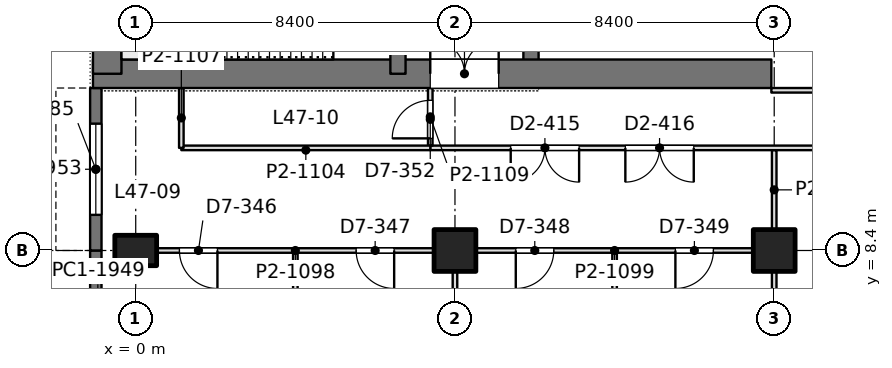
"""IFC4 building model, lengths in metres.
Left out: names, types, materials, properties, quantities, classifications, styles, units other than length and angle.
Written with IfcOpenShell. Run it as: python <this file> out.ifc"""

import sys

from ifc_helpers import new_model, si_unit, direction, frame, frame_2d, origin, origin_2d, place, context, subcontext, project, spatial, rectangle, extrude, element, fill, save


model = new_model("IFC4")
c1 = context("Model", 3, precision=1e-05, world=origin(), true_north=direction((0.0, 1.0)))
c2 = subcontext(c1, "Body", "Model", "MODEL_VIEW")
j1 = project(units=[si_unit("LENGTHUNIT", "METRE"), si_unit("PLANEANGLEUNIT", "RADIAN")], contexts=[c1])
p1 = place(None, origin())
s1 = spatial("IfcSite", under=j1, at=p1, CompositionType="ELEMENT")
p2 = place(p1, origin())
s2 = spatial("IfcBuilding", under=s1, at=p2, CompositionType="ELEMENT")
p3 = place(p2, frame((0.0, 0.0, 207.0)))
s3 = spatial("IfcBuildingStorey", under=s2, at=p3, CompositionType="ELEMENT", Elevation=207.0)
p4 = place(p3, frame((0.0, 8.4, 0.0), z_axis=(0.0, 0.0, 1.0), x_axis=(0.0, 1.0, 0.0)))
e1 = element("IfcColumn", 1, at=p4, inside=s3, PredefinedType="COLUMN", context=c2, shape_type="SweptSolid", body=[
    extrude(rectangle(XDim=0.8, YDim=1.1, at=origin_2d()), origin(), (0.0, 0.0, 1.0), 4.2),
])
for number, where, z_axis, x_axis in (
    (2, (8.4, 8.4, 0.0), (0.0, 0.0, 1.0), (1.0, 0.0, 0.0)),
    (3, (16.8, 8.4, 0.0), (0.0, 0.0, 1.0), (1.0, 0.0, 0.0)),
):
    element("IfcColumn", number, at=place(p3, frame(where, z_axis=z_axis, x_axis=x_axis)), inside=s3, PredefinedType="COLUMN", context=c2, shape_type="SweptSolid", body=[
        extrude(rectangle(XDim=1.1, YDim=1.1, at=origin_2d()), origin(), (0.0, 0.0, 1.0), 4.2),
    ])
p5 = place(p3, frame((-1.125, 13.05, 0.0), z_axis=(0.0, 0.0, 1.0), x_axis=(1.0, 0.0, 0.0)))
e4 = element("IfcWall", 4, at=p5, inside=s3, PredefinedType="SHEAR", context=c2, shape_type="SweptSolid", body=[
    extrude(rectangle(XDim=17.85, YDim=0.75, at=frame_2d((8.925, 0.0))), origin(), (0.0, 0.0, 1.0), 4.2),
])
p6 = place(p5, frame((8.875, 0.0, 0.0)))
e5 = element("IfcOpeningElement", 5, at=p6, cuts=e4, PredefinedType="OPENING", context=c2, shape_type="SweptSolid", body=[
    extrude(rectangle(XDim=1.8, YDim=2.4, at=frame_2d((0.9, 1.2))), frame((0.0, 0.385, 0.0), z_axis=(0.0, -1.0, 0.0), x_axis=(1.0, 0.0, 0.0)), (0.0, 0.0, 1.0), 0.77),
])
p7 = place(p3, frame((-0.75, 13.05, 0.0), z_axis=(0.0, 0.0, 1.0), x_axis=(0.0, 1.0, 0.0)))
e6 = element("IfcWall", 6, at=p7, inside=s3, PredefinedType="SHEAR", context=c2, shape_type="SweptSolid", body=[
    extrude(rectangle(XDim=24.3, YDim=0.75, at=frame_2d((12.15, 0.0))), origin(), (0.0, 0.0, 1.0), 4.2),
])
p8 = place(p3, frame((6.9, 13.05, 0.0), z_axis=(0.0, 0.0, 1.0), x_axis=(0.0, 1.0, 0.0)))
e7 = element("IfcWall", 7, at=p8, inside=s3, PredefinedType="SHEAR", context=c2, shape_type="SweptSolid", body=[
    extrude(rectangle(XDim=24.3, YDim=0.4, at=frame_2d((12.15, 0.0))), origin(), (0.0, 0.0, 1.0), 4.2),
])
p9 = place(p8, frame((1.3, 0.0, 0.0)))
e8 = element("IfcOpeningElement", 8, at=p9, cuts=e7, PredefinedType="OPENING", context=c2, shape_type="SweptSolid", body=[
    extrude(rectangle(XDim=1.0, YDim=2.2, at=frame_2d((0.5, 1.1))), frame((0.0, 0.21, 0.0), z_axis=(0.0, -1.0, 0.0), x_axis=(1.0, 0.0, 0.0)), (0.0, 0.0, 1.0), 0.42),
])
p10 = place(p8, frame((22.0, 0.0, 0.0)))
e9 = element("IfcOpeningElement", 9, at=p10, cuts=e7, PredefinedType="OPENING", context=c2, shape_type="SweptSolid", body=[
    extrude(rectangle(XDim=1.0, YDim=2.2, at=frame_2d((0.5, 1.1))), frame((0.0, 0.21, 0.0), z_axis=(0.0, -1.0, 0.0), x_axis=(1.0, 0.0, 0.0)), (0.0, 0.0, 1.0), 0.42),
])
p11 = place(p8, frame((5.55, 0.0, 0.0)))
e10 = element("IfcOpeningElement", 10, at=p11, cuts=e7, PredefinedType="OPENING", context=c2, shape_type="SweptSolid", body=[
    extrude(rectangle(XDim=1.0, YDim=2.2, at=frame_2d((0.5, 1.1))), frame((0.0, 0.21, 0.0), z_axis=(0.0, -1.0, 0.0), x_axis=(1.0, 0.0, 0.0)), (0.0, 0.0, 1.0), 0.42),
])
p12 = place(p8, frame((9.55, 0.0, 0.0)))
e11 = element("IfcOpeningElement", 11, at=p12, cuts=e7, PredefinedType="OPENING", context=c2, shape_type="SweptSolid", body=[
    extrude(rectangle(XDim=1.0, YDim=2.2, at=frame_2d((0.5, 1.1))), frame((0.0, 0.21, 0.0), z_axis=(0.0, -1.0, 0.0), x_axis=(1.0, 0.0, 0.0)), (0.0, 0.0, 1.0), 0.42),
])
p13 = place(p8, frame((12.8, 0.0, 0.0)))
e12 = element("IfcOpeningElement", 12, at=p13, cuts=e7, PredefinedType="OPENING", context=c2, shape_type="SweptSolid", body=[
    extrude(rectangle(XDim=1.1, YDim=2.2, at=frame_2d((0.55, 1.1))), frame((0.0, 0.21, 0.0), z_axis=(0.0, -1.0, 0.0), x_axis=(1.0, 0.0, 0.0)), (0.0, 0.0, 1.0), 0.42),
])
p14 = place(p8, frame((15.538, 0.0, 0.0)))
e13 = element("IfcOpeningElement", 13, at=p14, cuts=e7, PredefinedType="OPENING", context=c2, shape_type="SweptSolid", body=[
    extrude(rectangle(XDim=1.1, YDim=2.2, at=frame_2d((0.55, 1.1))), frame((0.0, 0.21, 0.0), z_axis=(0.0, -1.0, 0.0), x_axis=(1.0, 0.0, 0.0)), (0.0, 0.0, 1.0), 0.42),
])
p15 = place(p8, frame((18.262, 0.0, 0.0)))
e14 = element("IfcOpeningElement", 14, at=p15, cuts=e7, PredefinedType="OPENING", context=c2, shape_type="SweptSolid", body=[
    extrude(rectangle(XDim=1.1, YDim=2.2, at=frame_2d((0.55, 1.1))), frame((0.0, 0.21, 0.0), z_axis=(0.0, -1.0, 0.0), x_axis=(1.0, 0.0, 0.0)), (0.0, 0.0, 1.0), 0.42),
])
p16 = place(p3, frame((10.4, 13.05, 0.0), z_axis=(0.0, 0.0, 1.0), x_axis=(0.0, 1.0, 0.0)))
e15 = element("IfcWall", 15, at=p16, inside=s3, PredefinedType="SHEAR", context=c2, shape_type="SweptSolid", body=[
    extrude(rectangle(XDim=24.3, YDim=0.4, at=frame_2d((12.15, 0.0))), origin(), (0.0, 0.0, 1.0), 4.2),
])
p17 = place(p16, frame((15.75, 0.0, 0.0)))
e16 = element("IfcOpeningElement", 16, at=p17, cuts=e15, PredefinedType="OPENING", context=c2, shape_type="SweptSolid", body=[
    extrude(rectangle(XDim=1.1, YDim=2.2, at=frame_2d((0.55, 1.1))), frame((0.0, 0.21, 0.0), z_axis=(0.0, -1.0, 0.0), x_axis=(1.0, 0.0, 0.0)), (0.0, 0.0, 1.0), 0.42),
])
p18 = place(p16, frame((18.6, 0.0, 0.0)))
e17 = element("IfcOpeningElement", 17, at=p18, cuts=e15, PredefinedType="OPENING", context=c2, shape_type="SweptSolid", body=[
    extrude(rectangle(XDim=1.1, YDim=2.2, at=frame_2d((0.55, 1.1))), frame((0.0, 0.21, 0.0), z_axis=(0.0, -1.0, 0.0), x_axis=(1.0, 0.0, 0.0)), (0.0, 0.0, 1.0), 0.42),
])
p19 = place(p16, frame((21.45, 0.0, 0.0)))
e18 = element("IfcOpeningElement", 18, at=p19, cuts=e15, PredefinedType="OPENING", context=c2, shape_type="SweptSolid", body=[
    extrude(rectangle(XDim=1.1, YDim=2.2, at=frame_2d((0.55, 1.1))), frame((0.0, 0.21, 0.0), z_axis=(0.0, -1.0, 0.0), x_axis=(1.0, 0.0, 0.0)), (0.0, 0.0, 1.0), 0.42),
])
p20 = place(p16, frame((8.65, 0.0, 0.0)))
e19 = element("IfcOpeningElement", 19, at=p20, cuts=e15, PredefinedType="OPENING", context=c2, shape_type="SweptSolid", body=[
    extrude(rectangle(XDim=1.8, YDim=2.4, at=frame_2d((0.9, 1.2))), frame((0.0, 0.21, 0.0), z_axis=(0.0, -1.0, 0.0), x_axis=(1.0, 0.0, 0.0)), (0.0, 0.0, 1.0), 0.42),
])
p21 = place(p3, frame((-1.05, 5.915, 0.0), z_axis=(0.0, 0.0, 1.0), x_axis=(0.0, 1.0, 0.0)))
e20 = element("IfcWall", 20, at=p21, inside=s3, PredefinedType="SOLIDWALL", context=c2, shape_type="SweptSolid", body=[
    extrude(rectangle(XDim=2.485, YDim=0.3, at=frame_2d((1.243, 0.0))), origin(), (0.0, 0.0, 1.0), 4.05),
])
p22 = place(p3, frame((-1.05, 8.4, 0.0), z_axis=(0.0, 0.0, 1.0), x_axis=(0.0, 1.0, 0.0)))
e21 = element("IfcWall", 21, at=p22, inside=s3, PredefinedType="SOLIDWALL", context=c2, shape_type="SweptSolid", body=[
    extrude(rectangle(XDim=4.275, YDim=0.3, at=frame_2d((2.138, 0.0))), origin(), (0.0, 0.0, 1.0), 4.05),
])
p23 = place(p22, frame((0.938, 0.0, 0.9)))
e22 = element("IfcOpeningElement", 22, at=p23, cuts=e21, PredefinedType="OPENING", context=c2, shape_type="SweptSolid", body=[
    extrude(rectangle(XDim=2.4, YDim=1.9, at=frame_2d((1.2, 0.95))), frame((0.0, 0.16, 0.0), z_axis=(0.0, -1.0, 0.0), x_axis=(1.0, 0.0, 0.0)), (0.0, 0.0, 1.0), 0.32),
])
p24 = place(p3, frame((0.549, 8.4, 0.0), z_axis=(0.0, 0.0, 1.0), x_axis=(1.0, 0.0, 0.0)))
e23 = element("IfcWall", 23, at=p24, inside=s3, PredefinedType="PARTITIONING", context=c2, shape_type="SweptSolid", body=[
    extrude(rectangle(XDim=7.302, YDim=0.12, at=frame_2d((3.651, 0.0))), origin(), (0.0, 0.0, 1.0), 3.55),
])
p25 = place(p24, frame((0.601, 0.0, 0.0)))
e24 = element("IfcOpeningElement", 24, at=p25, cuts=e23, PredefinedType="OPENING", context=c2, shape_type="SweptSolid", body=[
    extrude(rectangle(XDim=1.0, YDim=2.4, at=frame_2d((0.5, 1.2))), frame((0.0, 0.07, 0.0), z_axis=(0.0, -1.0, 0.0), x_axis=(1.0, 0.0, 0.0)), (0.0, 0.0, 1.0), 0.14),
])
p26 = place(p24, frame((5.251, 0.0, 0.0)))
e25 = element("IfcOpeningElement", 25, at=p26, cuts=e23, PredefinedType="OPENING", context=c2, shape_type="SweptSolid", body=[
    extrude(rectangle(XDim=1.0, YDim=2.4, at=frame_2d((0.5, 1.2))), frame((0.0, 0.07, 0.0), z_axis=(0.0, -1.0, 0.0), x_axis=(1.0, 0.0, 0.0)), (0.0, 0.0, 1.0), 0.14),
])
p27 = place(p3, frame((8.949, 8.4, 0.0), z_axis=(0.0, 0.0, 1.0), x_axis=(1.0, 0.0, 0.0)))
e26 = element("IfcWall", 26, at=p27, inside=s3, PredefinedType="PARTITIONING", context=c2, shape_type="SweptSolid", body=[
    extrude(rectangle(XDim=7.302, YDim=0.12, at=frame_2d((3.651, 0.0))), origin(), (0.0, 0.0, 1.0), 3.55),
])
p28 = place(p27, frame((1.051, 0.0, 0.0)))
e27 = element("IfcOpeningElement", 27, at=p28, cuts=e26, PredefinedType="OPENING", context=c2, shape_type="SweptSolid", body=[
    extrude(rectangle(XDim=1.0, YDim=2.4, at=frame_2d((0.5, 1.2))), frame((0.0, 0.07, 0.0), z_axis=(0.0, -1.0, 0.0), x_axis=(1.0, 0.0, 0.0)), (0.0, 0.0, 1.0), 0.14),
])
p29 = place(p27, frame((5.251, 0.0, 0.0)))
e28 = element("IfcOpeningElement", 28, at=p29, cuts=e26, PredefinedType="OPENING", context=c2, shape_type="SweptSolid", body=[
    extrude(rectangle(XDim=1.0, YDim=2.4, at=frame_2d((0.5, 1.2))), frame((0.0, 0.07, 0.0), z_axis=(0.0, -1.0, 0.0), x_axis=(1.0, 0.0, 0.0)), (0.0, 0.0, 1.0), 0.14),
])
p30 = place(p3, frame((4.2, 4.7, 0.0), z_axis=(0.0, 0.0, 1.0), x_axis=(0.0, 1.0, 0.0)))
e29 = element("IfcWall", 29, at=p30, inside=s3, PredefinedType="PARTITIONING", context=c2, shape_type="SweptSolid", body=[
    extrude(rectangle(XDim=3.642, YDim=0.12, at=frame_2d((1.821, 0.0))), origin(), (0.0, 0.0, 1.0), 3.55),
])
p31 = place(p3, frame((8.4, 6.149, 0.0), z_axis=(0.0, 0.0, 1.0), x_axis=(0.0, 1.0, 0.0)))
e30 = element("IfcWall", 30, at=p31, inside=s3, PredefinedType="PARTITIONING", context=c2, shape_type="SweptSolid", body=[
    extrude(rectangle(XDim=1.702, YDim=0.12, at=frame_2d((0.851, 0.0))), origin(), (0.0, 0.0, 1.0), 3.69),
])
p32 = place(p3, frame((12.6, 4.7, 0.0), z_axis=(0.0, 0.0, 1.0), x_axis=(0.0, 1.0, 0.0)))
e31 = element("IfcWall", 31, at=p32, inside=s3, PredefinedType="PARTITIONING", context=c2, shape_type="SweptSolid", body=[
    extrude(rectangle(XDim=3.642, YDim=0.12, at=frame_2d((1.821, 0.0))), origin(), (0.0, 0.0, 1.0), 3.55),
])
p33 = place(p3, frame((16.8, 6.149, 0.0), z_axis=(0.0, 0.0, 1.0), x_axis=(0.0, 1.0, 0.0)))
e32 = element("IfcWall", 32, at=p33, inside=s3, PredefinedType="PARTITIONING", context=c2, shape_type="SweptSolid", body=[
    extrude(rectangle(XDim=1.702, YDim=0.12, at=frame_2d((0.851, 0.0))), origin(), (0.0, 0.0, 1.0), 3.69),
])
p34 = place(p3, frame((16.8, 8.949, 0.0), z_axis=(0.0, 0.0, 1.0), x_axis=(0.0, 1.0, 0.0)))
e33 = element("IfcWall", 33, at=p34, inside=s3, PredefinedType="PARTITIONING", context=c2, shape_type="SweptSolid", body=[
    extrude(rectangle(XDim=2.093, YDim=0.12, at=frame_2d((1.046, 0.0))), origin(), (0.0, 0.0, 1.0), 3.69),
])
p35 = place(p3, frame((7.748, 11.1, 0.0), z_axis=(0.0, 0.0, 1.0), x_axis=(1.0, 0.0, 0.0)))
e34 = element("IfcWall", 34, at=p35, inside=s3, PredefinedType="PARTITIONING", context=c2, shape_type="SweptSolid", body=[
    extrude(rectangle(XDim=34.904, YDim=0.12, at=frame_2d((17.452, 0.0))), origin(), (0.0, 0.0, 1.0), 3.55),
])
p36 = place(p35, frame((2.119, 0.0, 0.0)))
e35 = element("IfcOpeningElement", 35, at=p36, cuts=e34, PredefinedType="OPENING", context=c2, shape_type="SweptSolid", body=[
    extrude(rectangle(XDim=1.8, YDim=2.2, at=frame_2d((0.9, 1.1))), frame((0.0, 0.07, 0.0), z_axis=(0.0, -1.0, 0.0), x_axis=(1.0, 0.0, 0.0)), (0.0, 0.0, 1.0), 0.14),
])
p37 = place(p35, frame((5.135, 0.0, 0.0)))
e36 = element("IfcOpeningElement", 36, at=p37, cuts=e34, PredefinedType="OPENING", context=c2, shape_type="SweptSolid", body=[
    extrude(rectangle(XDim=1.8, YDim=2.2, at=frame_2d((0.9, 1.1))), frame((0.0, 0.07, 0.0), z_axis=(0.0, -1.0, 0.0), x_axis=(1.0, 0.0, 0.0)), (0.0, 0.0, 1.0), 0.14),
])
p38 = place(p35, frame((13.752, 0.0, 0.0)))
e37 = element("IfcOpeningElement", 37, at=p38, cuts=e34, PredefinedType="OPENING", context=c2, shape_type="SweptSolid", body=[
    extrude(rectangle(XDim=1.8, YDim=2.2, at=frame_2d((0.9, 1.1))), frame((0.0, 0.07, 0.0), z_axis=(0.0, -1.0, 0.0), x_axis=(1.0, 0.0, 0.0)), (0.0, 0.0, 1.0), 0.14),
])
p39 = place(p35, frame((19.352, 0.0, 0.0)))
e38 = element("IfcOpeningElement", 38, at=p39, cuts=e34, PredefinedType="OPENING", context=c2, shape_type="SweptSolid", body=[
    extrude(rectangle(XDim=1.8, YDim=2.2, at=frame_2d((0.9, 1.1))), frame((0.0, 0.07, 0.0), z_axis=(0.0, -1.0, 0.0), x_axis=(1.0, 0.0, 0.0)), (0.0, 0.0, 1.0), 0.14),
])
p40 = place(p35, frame((27.969, 0.0, 0.0)))
e39 = element("IfcOpeningElement", 39, at=p40, cuts=e34, PredefinedType="OPENING", context=c2, shape_type="SweptSolid", body=[
    extrude(rectangle(XDim=1.8, YDim=2.2, at=frame_2d((0.9, 1.1))), frame((0.0, 0.07, 0.0), z_axis=(0.0, -1.0, 0.0), x_axis=(1.0, 0.0, 0.0)), (0.0, 0.0, 1.0), 0.14),
])
p41 = place(p35, frame((30.985, 0.0, 0.0)))
e40 = element("IfcOpeningElement", 40, at=p41, cuts=e34, PredefinedType="OPENING", context=c2, shape_type="SweptSolid", body=[
    extrude(rectangle(XDim=1.8, YDim=2.2, at=frame_2d((0.9, 1.1))), frame((0.0, 0.07, 0.0), z_axis=(0.0, -1.0, 0.0), x_axis=(1.0, 0.0, 0.0)), (0.0, 0.0, 1.0), 0.14),
])
p42 = place(p3, frame((7.75, 11.158, 0.0), z_axis=(0.0, 0.0, 1.0), x_axis=(0.0, 1.0, 0.0)))
e41 = element("IfcWall", 41, at=p42, inside=s3, PredefinedType="PARTITIONING", context=c2, shape_type="SweptSolid", body=[
    extrude(rectangle(XDim=1.518, YDim=0.12, at=frame_2d((0.759, 0.0))), origin(), (0.0, 0.0, 1.0), 4.05),
])
p43 = place(p42, frame((0.192, 0.0, 0.0)))
e42 = element("IfcOpeningElement", 42, at=p43, cuts=e41, PredefinedType="OPENING", context=c2, shape_type="SweptSolid", body=[
    extrude(rectangle(XDim=1.0, YDim=2.4, at=frame_2d((0.5, 1.2))), frame((0.0, 0.07, 0.0), z_axis=(0.0, -1.0, 0.0), x_axis=(1.0, 0.0, 0.0)), (0.0, 0.0, 1.0), 0.14),
])
p44 = place(p3, frame((1.2, 11.1, 0.0), z_axis=(0.0, 0.0, 1.0), x_axis=(1.0, 0.0, 0.0)))
e43 = element("IfcWall", 43, at=p44, inside=s3, PredefinedType="PARTITIONING", context=c2, shape_type="SweptSolid", body=[
    extrude(rectangle(XDim=6.552, YDim=0.12, at=frame_2d((3.276, 0.0))), origin(), (0.0, 0.0, 1.0), 4.05),
])
p45 = place(p3, frame((1.2, 11.1, 0.0), z_axis=(0.0, 0.0, 1.0), x_axis=(0.0, 1.0, 0.0)))
e44 = element("IfcWall", 44, at=p45, inside=s3, PredefinedType="PARTITIONING", context=c2, shape_type="SweptSolid", body=[
    extrude(rectangle(XDim=1.576, YDim=0.12, at=frame_2d((0.788, 0.0))), origin(), (0.0, 0.0, 1.0), 4.05),
])
p46 = place(p3, frame((16.725, 12.615, 0.0), z_axis=(0.0, 0.0, 1.0), x_axis=(1.0, 0.0, 0.0)))
e45 = element("IfcWall", 45, at=p46, inside=s3, PredefinedType="PARTITIONING", context=c2, shape_type="SweptSolid", body=[
    extrude(rectangle(XDim=16.95, YDim=0.12, at=frame_2d((8.475, 0.0))), origin(), (0.0, 0.0, 1.0), 3.55),
])
p47 = place(p46, frame((7.575, 0.0, 0.0)))
e46 = element("IfcOpeningElement", 46, at=p47, cuts=e45, PredefinedType="OPENING", context=c2, shape_type="SweptSolid", body=[
    extrude(rectangle(XDim=1.8, YDim=2.2, at=frame_2d((0.9, 1.1))), frame((0.0, 0.07, 0.0), z_axis=(0.0, -1.0, 0.0), x_axis=(1.0, 0.0, 0.0)), (0.0, 0.0, 1.0), 0.14),
])
p48 = place(p23, origin())
e47 = element("IfcWindow", 47, at=p48, inside=s3, PartitioningType="SINGLE_PANEL", PredefinedType="WINDOW", context=c2, shape_type="SweptSolid", body=[
    extrude(rectangle(XDim=2.4, YDim=1.9, at=frame_2d((1.2, 0.95))), frame((0.0, 0.03, 0.0), z_axis=(0.0, -1.0, 0.0), x_axis=(1.0, 0.0, 0.0)), (0.0, 0.0, 1.0), 0.06),
])
fill(e22, e47)
p49 = place(p6, origin())
e48 = element("IfcDoor", 48, at=p49, inside=s3, OperationType="DOUBLE_DOOR_SINGLE_SWING", PredefinedType="DOOR", context=c2, shape_type="SweptSolid", body=[
    extrude(rectangle(XDim=1.8, YDim=2.4, at=frame_2d((0.9, 1.2))), frame((0.0, 0.025, 0.0), z_axis=(0.0, -1.0, 0.0), x_axis=(1.0, 0.0, 0.0)), (0.0, 0.0, 1.0), 0.05),
])
fill(e5, e48)
p50 = place(p25, frame((1.0, 0.0, 0.0), z_axis=(0.0, 0.0, 1.0), x_axis=(-1.0, 0.0, 0.0)))
e49 = element("IfcDoor", 49, at=p50, inside=s3, OperationType="SINGLE_SWING_LEFT", PredefinedType="DOOR", context=c2, shape_type="SweptSolid", body=[
    extrude(rectangle(XDim=1.0, YDim=2.4, at=frame_2d((0.5, 1.2))), frame((0.0, 0.025, 0.0), z_axis=(0.0, -1.0, 0.0), x_axis=(1.0, 0.0, 0.0)), (0.0, 0.0, 1.0), 0.05),
])
fill(e24, e49)
p51 = place(p26, frame((1.0, 0.0, 0.0), z_axis=(0.0, 0.0, 1.0), x_axis=(-1.0, 0.0, 0.0)))
e50 = element("IfcDoor", 50, at=p51, inside=s3, OperationType="SINGLE_SWING_LEFT", PredefinedType="DOOR", context=c2, shape_type="SweptSolid", body=[
    extrude(rectangle(XDim=1.0, YDim=2.4, at=frame_2d((0.5, 1.2))), frame((0.0, 0.025, 0.0), z_axis=(0.0, -1.0, 0.0), x_axis=(1.0, 0.0, 0.0)), (0.0, 0.0, 1.0), 0.05),
])
fill(e25, e50)
p52 = place(p28, frame((1.0, 0.0, 0.0), z_axis=(0.0, 0.0, 1.0), x_axis=(-1.0, 0.0, 0.0)))
e51 = element("IfcDoor", 51, at=p52, inside=s3, OperationType="SINGLE_SWING_RIGHT", PredefinedType="DOOR", context=c2, shape_type="SweptSolid", body=[
    extrude(rectangle(XDim=1.0, YDim=2.4, at=frame_2d((0.5, 1.2))), frame((0.0, 0.025, 0.0), z_axis=(0.0, -1.0, 0.0), x_axis=(1.0, 0.0, 0.0)), (0.0, 0.0, 1.0), 0.05),
])
fill(e27, e51)
p53 = place(p29, frame((1.0, 0.0, 0.0), z_axis=(0.0, 0.0, 1.0), x_axis=(-1.0, 0.0, 0.0)))
e52 = element("IfcDoor", 52, at=p53, inside=s3, OperationType="SINGLE_SWING_RIGHT", PredefinedType="DOOR", context=c2, shape_type="SweptSolid", body=[
    extrude(rectangle(XDim=1.0, YDim=2.4, at=frame_2d((0.5, 1.2))), frame((0.0, 0.025, 0.0), z_axis=(0.0, -1.0, 0.0), x_axis=(1.0, 0.0, 0.0)), (0.0, 0.0, 1.0), 0.05),
])
fill(e28, e52)
p54 = place(p36, frame((1.8, 0.0, 0.0), z_axis=(0.0, 0.0, 1.0), x_axis=(-1.0, 0.0, 0.0)))
e53 = element("IfcDoor", 53, at=p54, inside=s3, OperationType="DOUBLE_DOOR_SINGLE_SWING", PredefinedType="DOOR", context=c2, shape_type="SweptSolid", body=[
    extrude(rectangle(XDim=1.8, YDim=2.2, at=frame_2d((0.9, 1.1))), frame((0.0, 0.025, 0.0), z_axis=(0.0, -1.0, 0.0), x_axis=(1.0, 0.0, 0.0)), (0.0, 0.0, 1.0), 0.05),
])
fill(e35, e53)
p55 = place(p37, frame((1.8, 0.0, 0.0), z_axis=(0.0, 0.0, 1.0), x_axis=(-1.0, 0.0, 0.0)))
e54 = element("IfcDoor", 54, at=p55, inside=s3, OperationType="DOUBLE_DOOR_SINGLE_SWING", PredefinedType="DOOR", context=c2, shape_type="SweptSolid", body=[
    extrude(rectangle(XDim=1.8, YDim=2.2, at=frame_2d((0.9, 1.1))), frame((0.0, 0.025, 0.0), z_axis=(0.0, -1.0, 0.0), x_axis=(1.0, 0.0, 0.0)), (0.0, 0.0, 1.0), 0.05),
])
fill(e36, e54)
p56 = place(p43, origin())
e55 = element("IfcDoor", 55, at=p56, inside=s3, OperationType="SINGLE_SWING_LEFT", PredefinedType="DOOR", context=c2, shape_type="SweptSolid", body=[
    extrude(rectangle(XDim=1.0, YDim=2.4, at=frame_2d((0.5, 1.2))), frame((0.0, 0.025, 0.0), z_axis=(0.0, -1.0, 0.0), x_axis=(1.0, 0.0, 0.0)), (0.0, 0.0, 1.0), 0.05),
])
fill(e42, e55)
save(model, sys.argv[1])
